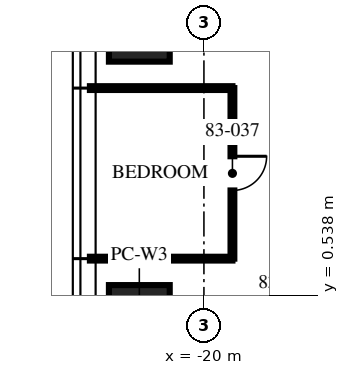
"""IFC4 building model, lengths in metres.
Left out: names, types, materials, properties, quantities, classifications, styles, units other than length and angle.
Written with IfcOpenShell. Run it as: python <this file> out.ifc"""

import sys

from ifc_helpers import new_model, si_unit, direction, frame, frame_2d, origin, origin_2d, place, context, subcontext, project, spatial, rectangle, extrude, element, fill, save


model = new_model("IFC4")
c1 = context("Model", 3, precision=1e-05, world=origin(), true_north=direction((0.0, 1.0)))
c2 = subcontext(c1, "Body", "Model", "MODEL_VIEW")
j1 = project(units=[si_unit("LENGTHUNIT", "METRE"), si_unit("PLANEANGLEUNIT", "RADIAN")], contexts=[c1])
p1 = place(None, origin())
s1 = spatial("IfcSite", under=j1, at=p1, CompositionType="ELEMENT")
p2 = place(p1, origin())
s2 = spatial("IfcBuilding", under=s1, at=p2, CompositionType="ELEMENT")
p3 = place(p2, frame((0.0, 0.0, 330.75)))
s3 = spatial("IfcBuildingStorey", under=s2, at=p3, CompositionType="ELEMENT", Elevation=330.75)
for number, where, z_axis, x_axis in (
    (1, (-21.7, 0.0, 0.0), (0.0, 0.0, 1.0), (0.0, 1.0, 0.0)),
    (2, (-21.7, 7.48, 0.0), (0.0, 0.0, 1.0), (0.0, 1.0, 0.0)),
):
    element("IfcColumn", number, at=place(p3, frame(where, z_axis=z_axis, x_axis=x_axis)), inside=s3, PredefinedType="COLUMN", context=c2, shape_type="SweptSolid", body=[
        extrude(rectangle(XDim=1.6, YDim=1.6, at=origin_2d()), origin(), (0.0, 0.0, 1.0), 3.75),
    ])
for number, where, z_axis, x_axis in (
    (3, (-19.25, 5.984, 0.0), (0.0, 0.0, 1.0), (-1.0, 0.0, 0.0)),
    (4, (-19.25, 1.496, 0.0), (0.0, 0.0, 1.0), (-1.0, 0.0, 0.0)),
):
    element("IfcWall", number, at=place(p3, frame(where, z_axis=z_axis, x_axis=x_axis)), inside=s3, PredefinedType="PARTITIONING", context=c2, shape_type="SweptSolid", body=[
        extrude(rectangle(XDim=3.75, YDim=0.1, at=frame_2d((1.875, 0.0))), origin(), (0.0, 0.0, 1.0), 3.01),
    ])
p4 = place(p3, frame((-19.25, 5.984, 0.0), z_axis=(0.0, 0.0, 1.0), x_axis=(0.0, -1.0, 0.0)))
e5 = element("IfcWall", 5, at=p4, inside=s3, PredefinedType="PARTITIONING", context=c2, shape_type="SweptSolid", body=[
    extrude(rectangle(XDim=4.488, YDim=0.1, at=frame_2d((2.244, 0.0))), origin(), (0.0, 0.0, 1.0), 2.91),
])
p5 = place(p4, frame((1.794, 0.0, 0.0)))
e6 = element("IfcOpeningElement", 6, at=p5, cuts=e5, PredefinedType="OPENING", context=c2, shape_type="SweptSolid", body=[
    extrude(rectangle(XDim=0.9, YDim=2.1, at=frame_2d((0.45, 1.05))), frame((0.0, 0.06, 0.0), z_axis=(0.0, -1.0, 0.0), x_axis=(1.0, 0.0, 0.0)), (0.0, 0.0, 1.0), 0.12),
])
p6 = place(p5, origin())
e7 = element("IfcDoor", 7, at=p6, inside=s3, OperationType="SINGLE_SWING_LEFT", PredefinedType="DOOR", context=c2, shape_type="SweptSolid", body=[
    extrude(rectangle(XDim=0.9, YDim=2.1, at=frame_2d((0.45, 1.05))), frame((0.0, 0.025, 0.0), z_axis=(0.0, -1.0, 0.0), x_axis=(1.0, 0.0, 0.0)), (0.0, 0.0, 1.0), 0.05),
])
fill(e6, e7)
save(model, sys.argv[1])
